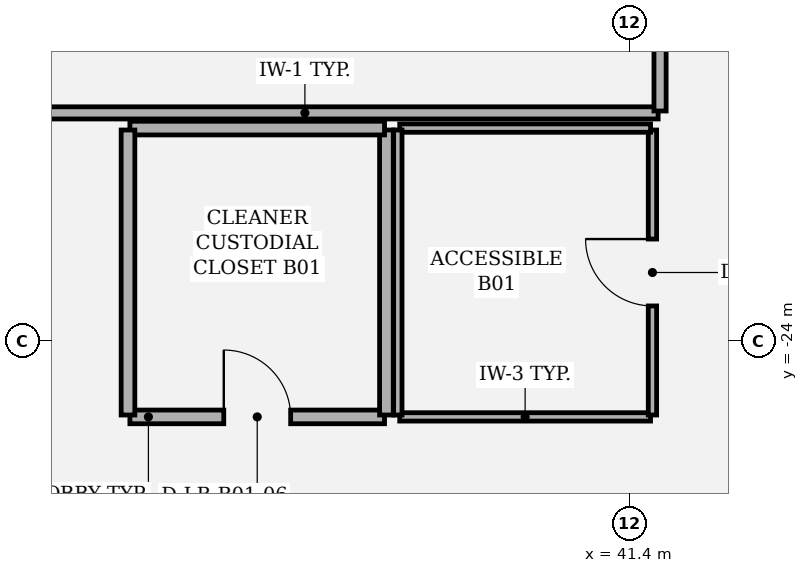
"""IFC4 building model, lengths in metres.
Left out: names, types, materials, properties, quantities, classifications, styles, units other than length and angle.
Written with IfcOpenShell. Run it as: python <this file> out.ifc"""

import sys

from ifc_helpers import new_model, si_unit, direction, frame, frame_2d, origin, place, context, subcontext, project, spatial, rectangle, extrude, element, fill, save


model = new_model("IFC4")
c1 = context("Model", 3, precision=1e-05, world=origin(), true_north=direction((0.0, 1.0)))
c2 = subcontext(c1, "Body", "Model", "MODEL_VIEW")
j1 = project(units=[si_unit("LENGTHUNIT", "METRE"), si_unit("PLANEANGLEUNIT", "RADIAN")], contexts=[c1])
p1 = place(None, origin())
s1 = spatial("IfcSite", under=j1, at=p1, CompositionType="ELEMENT")
p2 = place(p1, origin())
s2 = spatial("IfcBuilding", under=s1, at=p2, CompositionType="ELEMENT")
p3 = place(p2, frame((0.0, 0.0, -5.4)))
s3 = spatial("IfcBuildingStorey", under=s2, at=p3, CompositionType="ELEMENT", Elevation=-5.4)
p4 = place(p3, frame((38.375, -25.0, 0.0), z_axis=(0.0, 0.0, 1.0), x_axis=(1.0, 0.0, 0.0)))
e1 = element("IfcWall", 1, at=p4, inside=s3, PredefinedType="PARTITIONING", context=c2, shape_type="SweptSolid", body=[
    extrude(rectangle(XDim=3.3, YDim=0.11, at=frame_2d((1.65, 0.0))), origin(), (0.0, 0.0, 1.0), 5.1),
])
p5 = place(p3, frame((41.7, -24.975, 0.0), z_axis=(0.0, 0.0, 1.0), x_axis=(0.0, 1.0, 0.0)))
e2 = element("IfcWall", 2, at=p5, inside=s3, PredefinedType="PARTITIONING", context=c2, shape_type="SweptSolid", body=[
    extrude(rectangle(XDim=3.75, YDim=0.11, at=frame_2d((1.875, 0.0))), origin(), (0.0, 0.0, 1.0), 4.454),
])
p6 = place(p5, frame((1.435, 0.0, 0.0)))
e3 = element("IfcOpeningElement", 3, at=p6, cuts=e2, PredefinedType="OPENING", context=c2, shape_type="SweptSolid", body=[
    extrude(rectangle(XDim=0.88, YDim=2.1, at=frame_2d((0.44, 1.05))), frame((0.0, 0.065, 0.0), z_axis=(0.0, -1.0, 0.0), x_axis=(1.0, 0.0, 0.0)), (0.0, 0.0, 1.0), 0.13),
])
p7 = place(p3, frame((41.675, -21.2, 0.0), z_axis=(0.0, 0.0, 1.0), x_axis=(-1.0, 0.0, 0.0)))
e4 = element("IfcWall", 4, at=p7, inside=s3, PredefinedType="PARTITIONING", context=c2, shape_type="SweptSolid", body=[
    extrude(rectangle(XDim=3.3, YDim=0.11, at=frame_2d((1.65, 0.0))), origin(), (0.0, 0.0, 1.0), 5.1),
])
p8 = place(p3, frame((38.35, -21.225, 0.0), z_axis=(0.0, 0.0, 1.0), x_axis=(0.0, -1.0, 0.0)))
e5 = element("IfcWall", 5, at=p8, inside=s3, PredefinedType="PARTITIONING", context=c2, shape_type="SweptSolid", body=[
    extrude(rectangle(XDim=3.75, YDim=0.11, at=frame_2d((1.875, 0.0))), origin(), (0.0, 0.0, 1.0), 5.1),
])
p9 = place(p3, frame((32.48, -21.0, 0.0), z_axis=(0.0, 0.0, 1.0), x_axis=(1.0, 0.0, 0.0)))
e6 = element("IfcWall", 6, at=p9, inside=s3, PredefinedType="PARTITIONING", context=c2, shape_type="SweptSolid", body=[
    extrude(rectangle(XDim=9.295, YDim=0.16, at=frame_2d((4.647, 0.0))), origin(), (0.0, 0.0, 1.0), 5.1),
])
p10 = place(p3, frame((41.8, -20.975, 0.0), z_axis=(0.0, 0.0, 1.0), x_axis=(0.0, 1.0, 0.0)))
e7 = element("IfcWall", 7, at=p10, inside=s3, PredefinedType="PARTITIONING", context=c2, shape_type="SweptSolid", body=[
    extrude(rectangle(XDim=1.1, YDim=0.16, at=frame_2d((0.55, 0.0))), origin(), (0.0, 0.0, 1.0), 5.1),
])
p11 = place(p3, frame((34.825, -25.0, 0.0), z_axis=(0.0, 0.0, 1.0), x_axis=(1.0, 0.0, 0.0)))
e8 = element("IfcWall", 8, at=p11, inside=s3, PredefinedType="PARTITIONING", context=c2, shape_type="SweptSolid", body=[
    extrude(rectangle(XDim=3.35, YDim=0.18, at=frame_2d((1.675, 0.0))), origin(), (0.0, 0.0, 1.0), 5.1),
])
p12 = place(p11, frame((1.235, 0.0, 0.0)))
e9 = element("IfcOpeningElement", 9, at=p12, cuts=e8, PredefinedType="OPENING", context=c2, shape_type="SweptSolid", body=[
    extrude(rectangle(XDim=0.88, YDim=2.1, at=frame_2d((0.44, 1.05))), frame((0.0, 0.1, 0.0), z_axis=(0.0, -1.0, 0.0), x_axis=(1.0, 0.0, 0.0)), (0.0, 0.0, 1.0), 0.2),
])
p13 = place(p3, frame((38.2, -24.975, 0.0), z_axis=(0.0, 0.0, 1.0), x_axis=(0.0, 1.0, 0.0)))
e10 = element("IfcWall", 10, at=p13, inside=s3, PredefinedType="PARTITIONING", context=c2, shape_type="SweptSolid", body=[
    extrude(rectangle(XDim=3.75, YDim=0.18, at=frame_2d((1.875, 0.0))), origin(), (0.0, 0.0, 1.0), 5.1),
])
p14 = place(p3, frame((38.175, -21.2, 0.0), z_axis=(0.0, 0.0, 1.0), x_axis=(-1.0, 0.0, 0.0)))
e11 = element("IfcWall", 11, at=p14, inside=s3, PredefinedType="PARTITIONING", context=c2, shape_type="SweptSolid", body=[
    extrude(rectangle(XDim=3.35, YDim=0.18, at=frame_2d((1.675, 0.0))), origin(), (0.0, 0.0, 1.0), 5.1),
])
p15 = place(p3, frame((34.8, -21.225, 0.0), z_axis=(0.0, 0.0, 1.0), x_axis=(0.0, -1.0, 0.0)))
e12 = element("IfcWall", 12, at=p15, inside=s3, PredefinedType="PARTITIONING", context=c2, shape_type="SweptSolid", body=[
    extrude(rectangle(XDim=3.75, YDim=0.18, at=frame_2d((1.875, 0.0))), origin(), (0.0, 0.0, 1.0), 5.1),
])
p16 = place(p6, origin())
e13 = element("IfcDoor", 13, at=p16, inside=s3, OperationType="SINGLE_SWING_RIGHT", PredefinedType="DOOR", context=c2, shape_type="SweptSolid", body=[
    extrude(rectangle(XDim=0.88, YDim=2.1, at=frame_2d((0.44, 1.05))), frame((0.0, 0.025, 0.0), z_axis=(0.0, -1.0, 0.0), x_axis=(1.0, 0.0, 0.0)), (0.0, 0.0, 1.0), 0.05),
])
fill(e3, e13)
p17 = place(p12, origin())
e14 = element("IfcDoor", 14, at=p17, inside=s3, OperationType="SINGLE_SWING_LEFT", PredefinedType="DOOR", context=c2, shape_type="SweptSolid", body=[
    extrude(rectangle(XDim=0.88, YDim=2.1, at=frame_2d((0.44, 1.05))), frame((0.0, 0.025, 0.0), z_axis=(0.0, -1.0, 0.0), x_axis=(1.0, 0.0, 0.0)), (0.0, 0.0, 1.0), 0.05),
])
fill(e9, e14)
save(model, sys.argv[1])
